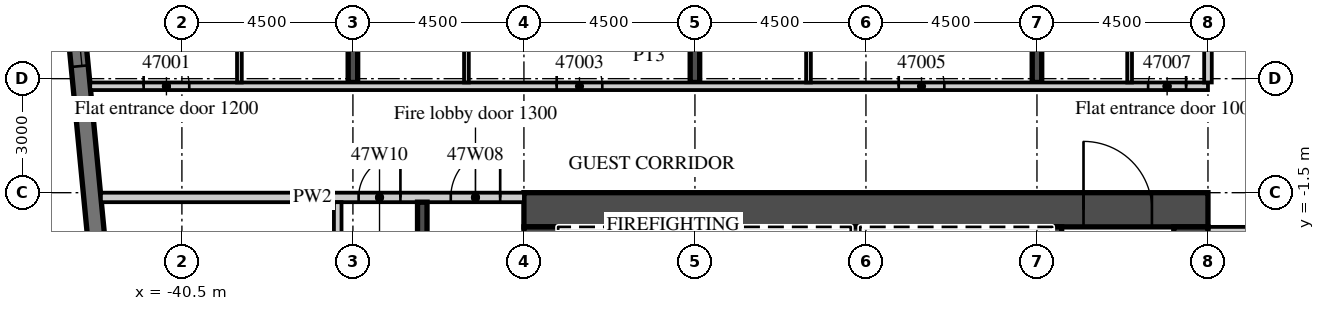
"""IFC4 building model, lengths in metres.
Left out: names, types, materials, properties, quantities, classifications, styles, units other than length and angle.
Written with IfcOpenShell. Run it as: python <this file> out.ifc"""

import sys

from ifc_helpers import new_model, si_unit, direction, frame, frame_2d, origin, place, context, subcontext, project, spatial, rectangle, extrude, element, fill, save


model = new_model("IFC4")
c1 = context("Model", 3, precision=1e-05, world=origin(), true_north=direction((0.0, 1.0)))
c2 = subcontext(c1, "Body", "Model", "MODEL_VIEW")
j1 = project(units=[si_unit("LENGTHUNIT", "METRE"), si_unit("PLANEANGLEUNIT", "RADIAN")], contexts=[c1])
p1 = place(None, origin())
s1 = spatial("IfcSite", under=j1, at=p1, CompositionType="ELEMENT")
p2 = place(p1, origin())
s2 = spatial("IfcBuilding", under=s1, at=p2, CompositionType="ELEMENT")
p3 = place(p2, frame((0.0, 0.0, 196.6)))
s3 = spatial("IfcBuildingStorey", under=s2, at=p3, CompositionType="ELEMENT", Elevation=196.6)
p4 = place(p3, frame((-36.0, 1.4, 0.0), z_axis=(0.0, 0.0, 1.0), x_axis=(0.0, 1.0, 0.0)))
e1 = element("IfcWall", 1, at=p4, inside=s3, PredefinedType="SHEAR", context=c2, shape_type="SweptSolid", body=[
    extrude(rectangle(XDim=15.401, YDim=0.25, at=frame_2d((7.701, 0.0))), origin(), (0.0, 0.0, 1.0), 3.3),
])
p5 = place(p3, frame((-27.0, 1.4, 0.0), z_axis=(0.0, 0.0, 1.0), x_axis=(0.0, 1.0, 0.0)))
e2 = element("IfcWall", 2, at=p5, inside=s3, PredefinedType="SHEAR", context=c2, shape_type="SweptSolid", body=[
    extrude(rectangle(XDim=16.268, YDim=0.25, at=frame_2d((8.134, 0.0))), origin(), (0.0, 0.0, 1.0), 3.3),
])
p6 = place(p3, frame((-18.0, 1.4, 0.0), z_axis=(0.0, 0.0, 1.0), x_axis=(0.0, 1.0, 0.0)))
e3 = element("IfcWall", 3, at=p6, inside=s3, PredefinedType="SHEAR", context=c2, shape_type="SweptSolid", body=[
    extrude(rectangle(XDim=17.134, YDim=0.25, at=frame_2d((8.567, 0.0))), origin(), (0.0, 0.0, 1.0), 3.3),
])
p7 = place(p3, frame((-44.214, 12.466, 0.0), z_axis=(0.0, 0.0, 1.0), x_axis=(0.095847314626, -0.995396047952, 0.0)))
e4 = element("IfcWall", 4, at=p7, inside=s3, PredefinedType="SOLIDWALL", context=c2, shape_type="SweptSolid", body=[
    extrude(rectangle(XDim=34.0, YDim=0.45, at=frame_2d((17.0, 0.0))), origin(), (0.0, 0.0, 1.0), 3.02),
])
p8 = place(p7, frame((2.865, 0.0, 0.45)))
e5 = element("IfcOpeningElement", 5, at=p8, cuts=e4, PredefinedType="OPENING", context=c2, shape_type="SweptSolid", body=[
    extrude(rectangle(XDim=3.3, YDim=2.25, at=frame_2d((1.65, 1.125))), frame((0.0, 0.235, 0.0), z_axis=(0.0, -1.0, 0.0), x_axis=(1.0, 0.0, 0.0)), (0.0, 0.0, 1.0), 0.47),
])
p9 = place(p7, frame((7.386, 0.0, 0.45)))
e6 = element("IfcOpeningElement", 6, at=p9, cuts=e4, PredefinedType="OPENING", context=c2, shape_type="SweptSolid", body=[
    extrude(rectangle(XDim=3.3, YDim=2.25, at=frame_2d((1.65, 1.125))), frame((0.0, 0.235, 0.0), z_axis=(0.0, -1.0, 0.0), x_axis=(1.0, 0.0, 0.0)), (0.0, 0.0, 1.0), 0.47),
])
p10 = place(p3, frame((-42.913, 1.3, 0.0), z_axis=(0.0, 0.0, 1.0), x_axis=(1.0, 0.0, 0.0)))
e7 = element("IfcWall", 7, at=p10, inside=s3, PredefinedType="PARTITIONING", context=c2, shape_type="SweptSolid", body=[
    extrude(rectangle(XDim=29.413, YDim=0.2, at=frame_2d((14.707, 0.0))), origin(), (0.0, 0.0, 1.0), 3.02),
])
p11 = place(p10, frame((1.406, 0.0, 0.0)))
e8 = element("IfcOpeningElement", 8, at=p11, cuts=e7, PredefinedType="OPENING", context=c2, shape_type="SweptSolid", body=[
    extrude(rectangle(XDim=1.2, YDim=2.1, at=frame_2d((0.6, 1.05))), frame((0.0, 0.11, 0.0), z_axis=(0.0, -1.0, 0.0), x_axis=(1.0, 0.0, 0.0)), (0.0, 0.0, 1.0), 0.22),
])
p12 = place(p10, frame((12.275, 0.0, 0.0)))
e9 = element("IfcOpeningElement", 9, at=p12, cuts=e7, PredefinedType="OPENING", context=c2, shape_type="SweptSolid", body=[
    extrude(rectangle(XDim=1.2, YDim=2.1, at=frame_2d((0.6, 1.05))), frame((0.0, 0.11, 0.0), z_axis=(0.0, -1.0, 0.0), x_axis=(1.0, 0.0, 0.0)), (0.0, 0.0, 1.0), 0.22),
])
p13 = place(p10, frame((21.275, 0.0, 0.0)))
e10 = element("IfcOpeningElement", 10, at=p13, cuts=e7, PredefinedType="OPENING", context=c2, shape_type="SweptSolid", body=[
    extrude(rectangle(XDim=1.2, YDim=2.1, at=frame_2d((0.6, 1.05))), frame((0.0, 0.11, 0.0), z_axis=(0.0, -1.0, 0.0), x_axis=(1.0, 0.0, 0.0)), (0.0, 0.0, 1.0), 0.22),
])
p14 = place(p10, frame((27.838, 0.0, 0.0)))
e11 = element("IfcOpeningElement", 11, at=p14, cuts=e7, PredefinedType="OPENING", context=c2, shape_type="SweptSolid", body=[
    extrude(rectangle(XDim=1.0, YDim=2.1, at=frame_2d((0.5, 1.05))), frame((0.0, 0.11, 0.0), z_axis=(0.0, -1.0, 0.0), x_axis=(1.0, 0.0, 0.0)), (0.0, 0.0, 1.0), 0.22),
])
p15 = place(p3, frame((-38.987, 1.4, 0.0), z_axis=(0.0, 0.0, 1.0), x_axis=(0.0, 1.0, 0.0)))
e12 = element("IfcWall", 12, at=p15, inside=s3, PredefinedType="PARTITIONING", context=c2, shape_type="SweptSolid", body=[
    extrude(rectangle(XDim=4.028, YDim=0.125, at=frame_2d((2.014, 0.0))), origin(), (0.0, 0.0, 1.0), 3.02),
])
p16 = place(p15, frame((2.45, 0.0, 0.0)))
e13 = element("IfcOpeningElement", 13, at=p16, cuts=e12, PredefinedType="OPENING", context=c2, shape_type="SweptSolid", body=[
    extrude(rectangle(XDim=0.9, YDim=2.1, at=frame_2d((0.45, 1.05))), frame((0.0, 0.073, 0.0), z_axis=(0.0, -1.0, 0.0), x_axis=(1.0, 0.0, 0.0)), (0.0, 0.0, 1.0), 0.145),
])
p17 = place(p3, frame((-33.013, 1.4, 0.0), z_axis=(0.0, 0.0, 1.0), x_axis=(0.0, 1.0, 0.0)))
e14 = element("IfcWall", 14, at=p17, inside=s3, PredefinedType="PARTITIONING", context=c2, shape_type="SweptSolid", body=[
    extrude(rectangle(XDim=7.225, YDim=0.125, at=frame_2d((3.613, 0.0))), origin(), (0.0, 0.0, 1.0), 3.02),
])
p18 = place(p17, frame((2.45, 0.0, 0.0)))
e15 = element("IfcOpeningElement", 15, at=p18, cuts=e14, PredefinedType="OPENING", context=c2, shape_type="SweptSolid", body=[
    extrude(rectangle(XDim=0.9, YDim=2.1, at=frame_2d((0.45, 1.05))), frame((0.0, 0.073, 0.0), z_axis=(0.0, -1.0, 0.0), x_axis=(1.0, 0.0, 0.0)), (0.0, 0.0, 1.0), 0.145),
])
p19 = place(p3, frame((-24.012, 1.4, 0.0), z_axis=(0.0, 0.0, 1.0), x_axis=(0.0, 1.0, 0.0)))
e16 = element("IfcWall", 16, at=p19, inside=s3, PredefinedType="PARTITIONING", context=c2, shape_type="SweptSolid", body=[
    extrude(rectangle(XDim=7.225, YDim=0.125, at=frame_2d((3.613, 0.0))), origin(), (0.0, 0.0, 1.0), 3.02),
])
p20 = place(p19, frame((2.45, 0.0, 0.0)))
e17 = element("IfcOpeningElement", 17, at=p20, cuts=e16, PredefinedType="OPENING", context=c2, shape_type="SweptSolid", body=[
    extrude(rectangle(XDim=0.9, YDim=2.1, at=frame_2d((0.45, 1.05))), frame((0.0, 0.073, 0.0), z_axis=(0.0, -1.0, 0.0), x_axis=(1.0, 0.0, 0.0)), (0.0, 0.0, 1.0), 0.145),
])
p21 = place(p3, frame((-13.5, 1.4, 0.0), z_axis=(0.0, 0.0, 1.0), x_axis=(0.0, 1.0, 0.0)))
e18 = element("IfcWall", 18, at=p21, inside=s3, PredefinedType="PARTITIONING", context=c2, shape_type="SweptSolid", body=[
    extrude(rectangle(XDim=17.59, YDim=0.2, at=frame_2d((8.795, 0.0))), origin(), (0.0, 0.0, 1.0), 3.02),
])
p22 = place(p3, frame((-15.562, 1.4, 0.0), z_axis=(0.0, 0.0, 1.0), x_axis=(0.0, 1.0, 0.0)))
e19 = element("IfcWall", 19, at=p22, inside=s3, PredefinedType="PARTITIONING", context=c2, shape_type="SweptSolid", body=[
    extrude(rectangle(XDim=7.225, YDim=0.125, at=frame_2d((3.613, 0.0))), origin(), (0.0, 0.0, 1.0), 3.02),
])
p23 = place(p22, frame((2.45, 0.0, 0.0)))
e20 = element("IfcOpeningElement", 20, at=p23, cuts=e19, PredefinedType="OPENING", context=c2, shape_type="SweptSolid", body=[
    extrude(rectangle(XDim=0.9, YDim=2.1, at=frame_2d((0.45, 1.05))), frame((0.0, 0.073, 0.0), z_axis=(0.0, -1.0, 0.0), x_axis=(1.0, 0.0, 0.0)), (0.0, 0.0, 1.0), 0.145),
])
p24 = place(p3, frame((-13.5, -2.5, 0.0), z_axis=(0.0, 0.0, 1.0), x_axis=(1.0, 0.0, 0.0)))
e21 = element("IfcWall", 21, at=p24, inside=s3, PredefinedType="PARTITIONING", context=c2, shape_type="SweptSolid", body=[
    extrude(rectangle(XDim=27.0, YDim=0.2, at=frame_2d((13.5, 0.0))), origin(), (0.0, 0.0, 1.0), 3.02),
])
p25 = place(p24, frame((2.925, 0.0, 0.0)))
e22 = element("IfcOpeningElement", 22, at=p25, cuts=e21, PredefinedType="OPENING", context=c2, shape_type="SweptSolid", body=[
    extrude(rectangle(XDim=1.0, YDim=2.1, at=frame_2d((0.5, 1.05))), frame((0.0, 0.11, 0.0), z_axis=(0.0, -1.0, 0.0), x_axis=(1.0, 0.0, 0.0)), (0.0, 0.0, 1.0), 0.22),
])
p26 = place(p24, frame((5.075, 0.0, 0.0)))
e23 = element("IfcOpeningElement", 23, at=p26, cuts=e21, PredefinedType="OPENING", context=c2, shape_type="SweptSolid", body=[
    extrude(rectangle(XDim=1.0, YDim=2.1, at=frame_2d((0.5, 1.05))), frame((0.0, 0.11, 0.0), z_axis=(0.0, -1.0, 0.0), x_axis=(1.0, 0.0, 0.0)), (0.0, 0.0, 1.0), 0.22),
])
p27 = place(p24, frame((11.925, 0.0, 0.0)))
e24 = element("IfcOpeningElement", 24, at=p27, cuts=e21, PredefinedType="OPENING", context=c2, shape_type="SweptSolid", body=[
    extrude(rectangle(XDim=1.0, YDim=2.1, at=frame_2d((0.5, 1.05))), frame((0.0, 0.11, 0.0), z_axis=(0.0, -1.0, 0.0), x_axis=(1.0, 0.0, 0.0)), (0.0, 0.0, 1.0), 0.22),
])
p28 = place(p24, frame((15.938, 0.0, 0.0)))
e25 = element("IfcOpeningElement", 25, at=p28, cuts=e21, PredefinedType="OPENING", context=c2, shape_type="SweptSolid", body=[
    extrude(rectangle(XDim=1.2, YDim=2.1, at=frame_2d((0.6, 1.05))), frame((0.0, 0.11, 0.0), z_axis=(0.0, -1.0, 0.0), x_axis=(1.0, 0.0, 0.0)), (0.0, 0.0, 1.0), 0.22),
])
p29 = place(p24, frame((25.425, 0.0, 0.0)))
e26 = element("IfcOpeningElement", 26, at=p29, cuts=e21, PredefinedType="OPENING", context=c2, shape_type="SweptSolid", body=[
    extrude(rectangle(XDim=1.0, YDim=2.1, at=frame_2d((0.5, 1.05))), frame((0.0, 0.11, 0.0), z_axis=(0.0, -1.0, 0.0), x_axis=(1.0, 0.0, 0.0)), (0.0, 0.0, 1.0), 0.22),
])
p30 = place(p3, frame((-31.5, -1.95, 0.0), z_axis=(0.0, 0.0, 1.0), x_axis=(1.0, 0.0, 0.0)))
e27 = element("IfcWall", 27, at=p30, inside=s3, PredefinedType="SHEAR", context=c2, shape_type="SweptSolid", body=[
    extrude(rectangle(XDim=18.0, YDim=0.9, at=frame_2d((9.0, 0.0))), origin(), (0.0, 0.0, 1.0), 3.02),
])
p31 = place(p30, frame((14.725, 0.0, 0.0)))
e28 = element("IfcOpeningElement", 28, at=p31, cuts=e27, PredefinedType="OPENING", context=c2, shape_type="SweptSolid", body=[
    extrude(rectangle(XDim=1.8, YDim=2.1, at=frame_2d((0.9, 1.05))), frame((0.0, 0.46, 0.0), z_axis=(0.0, -1.0, 0.0), x_axis=(1.0, 0.0, 0.0)), (0.0, 0.0, 1.0), 0.92),
])
p32 = place(p3, frame((-31.05, -15.2, 0.0), z_axis=(0.0, 0.0, 1.0), x_axis=(0.0, 1.0, 0.0)))
e29 = element("IfcWall", 29, at=p32, inside=s3, PredefinedType="SHEAR", context=c2, shape_type="SweptSolid", body=[
    extrude(rectangle(XDim=12.8, YDim=0.9, at=frame_2d((6.4, 0.0))), origin(), (0.0, 0.0, 1.0), 3.02),
])
p33 = place(p32, frame((11.5, 0.0, 0.0)))
e30 = element("IfcOpeningElement", 30, at=p33, cuts=e29, PredefinedType="OPENING", context=c2, shape_type="SweptSolid", body=[
    extrude(rectangle(XDim=1.1, YDim=2.1, at=frame_2d((0.55, 1.05))), frame((0.0, 0.46, 0.0), z_axis=(0.0, -1.0, 0.0), x_axis=(1.0, 0.0, 0.0)), (0.0, 0.0, 1.0), 0.92),
])
p34 = place(p3, frame((-13.95, -14.6, 0.0), z_axis=(0.0, 0.0, 1.0), x_axis=(0.0, 1.0, 0.0)))
e31 = element("IfcWall", 31, at=p34, inside=s3, PredefinedType="SHEAR", context=c2, shape_type="SweptSolid", body=[
    extrude(rectangle(XDim=12.2, YDim=0.9, at=frame_2d((6.1, 0.0))), origin(), (0.0, 0.0, 1.0), 3.02),
])
p35 = place(p3, frame((-17.475, -5.55, 0.0), z_axis=(0.0, 0.0, 1.0), x_axis=(0.0, 1.0, 0.0)))
e32 = element("IfcWall", 32, at=p35, inside=s3, PredefinedType="SHEAR", context=c2, shape_type="SweptSolid", body=[
    extrude(rectangle(XDim=3.15, YDim=0.25, at=frame_2d((1.575, 0.0))), origin(), (0.0, 0.0, 1.0), 3.02),
])
for number, where, z_axis, x_axis in (
    (33, (-27.975, -5.3, 0.0), (0.0, 0.0, 1.0), (0.0, 1.0, 0.0)),
    (34, (-22.775, -5.3, 0.0), (0.0, 0.0, 1.0), (0.0, 1.0, 0.0)),
):
    element("IfcWall", number, at=place(p3, frame(where, z_axis=z_axis, x_axis=x_axis)), inside=s3, PredefinedType="SHEAR", context=c2, shape_type="SweptSolid", body=[
        extrude(rectangle(XDim=2.9, YDim=0.25, at=frame_2d((1.45, 0.0))), origin(), (0.0, 0.0, 1.0), 3.02),
    ])
p36 = place(p3, frame((-42.632, -1.625, 0.0), z_axis=(0.0, 0.0, 1.0), x_axis=(1.0, 0.0, 0.0)))
e35 = element("IfcWall", 35, at=p36, inside=s3, PredefinedType="PARTITIONING", context=c2, shape_type="SweptSolid", body=[
    extrude(rectangle(XDim=11.132, YDim=0.25, at=frame_2d((5.566, 0.0))), origin(), (0.0, 0.0, 1.0), 3.02),
])
p37 = place(p36, frame((9.207, 0.0, 0.0)))
e36 = element("IfcOpeningElement", 36, at=p37, cuts=e35, PredefinedType="OPENING", context=c2, shape_type="SweptSolid", body=[
    extrude(rectangle(XDim=1.3, YDim=2.1, at=frame_2d((0.65, 1.05))), frame((0.0, 0.135, 0.0), z_axis=(0.0, -1.0, 0.0), x_axis=(1.0, 0.0, 0.0)), (0.0, 0.0, 1.0), 0.27),
])
p38 = place(p36, frame((6.781, 0.0, 0.0)))
e37 = element("IfcOpeningElement", 37, at=p38, cuts=e35, PredefinedType="OPENING", context=c2, shape_type="SweptSolid", body=[
    extrude(rectangle(XDim=1.1, YDim=2.1, at=frame_2d((0.55, 1.05))), frame((0.0, 0.135, 0.0), z_axis=(0.0, -1.0, 0.0), x_axis=(1.0, 0.0, 0.0)), (0.0, 0.0, 1.0), 0.27),
])
p39 = place(p3, frame((-34.175, -10.1, 0.0), z_axis=(0.0, 0.0, 1.0), x_axis=(0.0, 1.0, 0.0)))
e38 = element("IfcWall", 38, at=p39, inside=s3, PredefinedType="SHEAR", context=c2, shape_type="SweptSolid", body=[
    extrude(rectangle(XDim=8.35, YDim=0.25, at=frame_2d((4.175, 0.0))), origin(), (0.0, 0.0, 1.0), 3.02),
])
p40 = place(p3, frame((-36.4, -17.7, 0.0), z_axis=(0.0, 0.0, 1.0), x_axis=(0.0, 1.0, 0.0)))
e39 = element("IfcWall", 39, at=p40, inside=s3, PredefinedType="PARTITIONING", context=c2, shape_type="SweptSolid", body=[
    extrude(rectangle(XDim=15.95, YDim=0.2, at=frame_2d((7.975, 0.0))), origin(), (0.0, 0.0, 1.0), 3.02),
])
p41 = place(p40, frame((0.35, 0.0, 0.0)))
e40 = element("IfcOpeningElement", 40, at=p41, cuts=e39, PredefinedType="OPENING", context=c2, shape_type="SweptSolid", body=[
    extrude(rectangle(XDim=0.9, YDim=2.1, at=frame_2d((0.45, 1.05))), frame((0.0, 0.11, 0.0), z_axis=(0.0, -1.0, 0.0), x_axis=(1.0, 0.0, 0.0)), (0.0, 0.0, 1.0), 0.22),
])
p42 = place(p9, origin())
e41 = element("IfcWindow", 41, at=p42, inside=s3, PartitioningType="SINGLE_PANEL", PredefinedType="WINDOW", context=c2, shape_type="SweptSolid", body=[
    extrude(rectangle(XDim=3.3, YDim=2.25, at=frame_2d((1.65, 1.125))), frame((0.0, 0.09, 0.0), z_axis=(0.0, -1.0, 0.0), x_axis=(1.0, 0.0, 0.0)), (0.0, 0.0, 1.0), 0.06),
])
fill(e6, e41)
p43 = place(p11, origin())
e42 = element("IfcDoor", 42, at=p43, inside=s3, OperationType="SINGLE_SWING_LEFT", PredefinedType="DOOR", context=c2, shape_type="SweptSolid", body=[
    extrude(rectangle(XDim=1.2, YDim=2.1, at=frame_2d((0.6, 1.05))), frame((0.0, 0.025, 0.0), z_axis=(0.0, -1.0, 0.0), x_axis=(1.0, 0.0, 0.0)), (0.0, 0.0, 1.0), 0.05),
])
fill(e8, e42)
p44 = place(p12, origin())
e43 = element("IfcDoor", 43, at=p44, inside=s3, OperationType="SINGLE_SWING_LEFT", PredefinedType="DOOR", context=c2, shape_type="SweptSolid", body=[
    extrude(rectangle(XDim=1.2, YDim=2.1, at=frame_2d((0.6, 1.05))), frame((0.0, 0.025, 0.0), z_axis=(0.0, -1.0, 0.0), x_axis=(1.0, 0.0, 0.0)), (0.0, 0.0, 1.0), 0.05),
])
fill(e9, e43)
p45 = place(p13, origin())
e44 = element("IfcDoor", 44, at=p45, inside=s3, OperationType="SINGLE_SWING_LEFT", PredefinedType="DOOR", context=c2, shape_type="SweptSolid", body=[
    extrude(rectangle(XDim=1.2, YDim=2.1, at=frame_2d((0.6, 1.05))), frame((0.0, 0.025, 0.0), z_axis=(0.0, -1.0, 0.0), x_axis=(1.0, 0.0, 0.0)), (0.0, 0.0, 1.0), 0.05),
])
fill(e10, e44)
p46 = place(p14, origin())
e45 = element("IfcDoor", 45, at=p46, inside=s3, OperationType="SINGLE_SWING_RIGHT", PredefinedType="DOOR", context=c2, shape_type="SweptSolid", body=[
    extrude(rectangle(XDim=1.0, YDim=2.1, at=frame_2d((0.5, 1.05))), frame((0.0, 0.025, 0.0), z_axis=(0.0, -1.0, 0.0), x_axis=(1.0, 0.0, 0.0)), (0.0, 0.0, 1.0), 0.05),
])
fill(e11, e45)
p47 = place(p31, origin())
e46 = element("IfcDoor", 46, at=p47, inside=s3, OperationType="DOUBLE_DOOR_DOUBLE_SWING", PredefinedType="DOOR", context=c2, shape_type="SweptSolid", body=[
    extrude(rectangle(XDim=1.8, YDim=2.1, at=frame_2d((0.9, 1.05))), frame((0.0, 0.025, 0.0), z_axis=(0.0, -1.0, 0.0), x_axis=(1.0, 0.0, 0.0)), (0.0, 0.0, 1.0), 0.05),
])
fill(e28, e46)
p48 = place(p37, origin())
e47 = element("IfcDoor", 47, at=p48, inside=s3, OperationType="SINGLE_SWING_RIGHT", PredefinedType="DOOR", context=c2, shape_type="SweptSolid", body=[
    extrude(rectangle(XDim=1.3, YDim=2.1, at=frame_2d((0.65, 1.05))), frame((0.0, 0.025, 0.0), z_axis=(0.0, -1.0, 0.0), x_axis=(1.0, 0.0, 0.0)), (0.0, 0.0, 1.0), 0.05),
])
fill(e36, e47)
p49 = place(p38, origin())
e48 = element("IfcDoor", 48, at=p49, inside=s3, OperationType="SINGLE_SWING_RIGHT", PredefinedType="DOOR", context=c2, shape_type="SweptSolid", body=[
    extrude(rectangle(XDim=1.1, YDim=2.1, at=frame_2d((0.55, 1.05))), frame((0.0, 0.025, 0.0), z_axis=(0.0, -1.0, 0.0), x_axis=(1.0, 0.0, 0.0)), (0.0, 0.0, 1.0), 0.05),
])
fill(e37, e48)
save(model, sys.argv[1])
